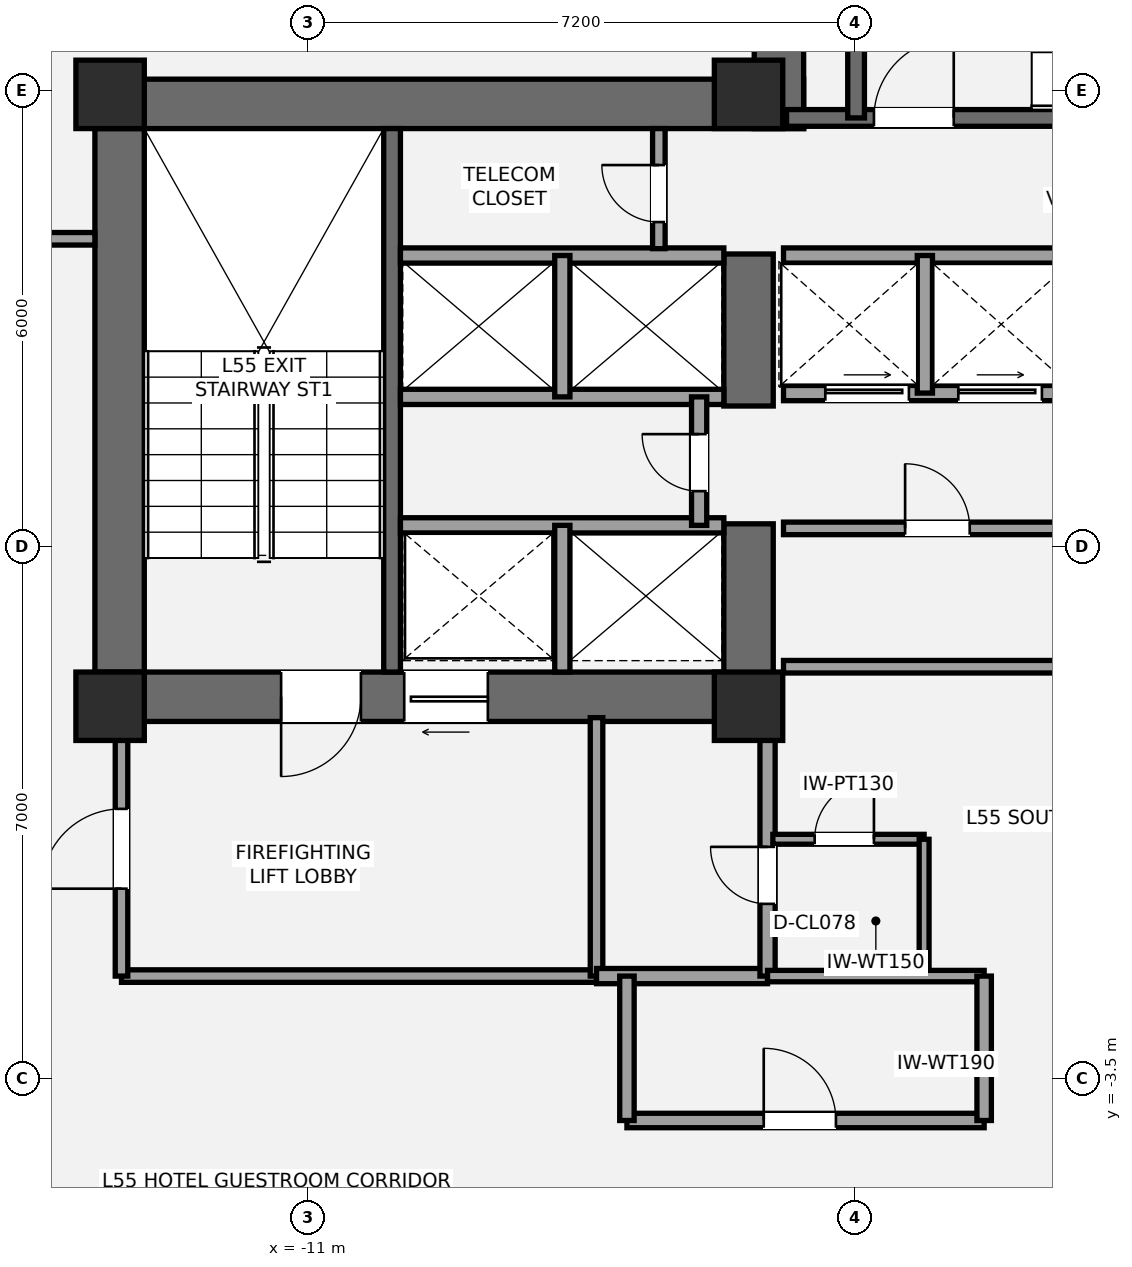
"""IFC4 building model, lengths in metres.
Left out: names, types, materials, properties, quantities, classifications, styles, units other than length and angle.
Written with IfcOpenShell. Run it as: python <this file> out.ifc"""

import sys

from ifc_helpers import new_model, si_unit, direction, frame, frame_2d, origin, origin_2d, place, context, subcontext, project, spatial, rectangle, extrude, element, fill, save


model = new_model("IFC4")
c1 = context("Model", 3, precision=1e-05, world=origin(), true_north=direction((0.0, 1.0)))
c2 = subcontext(c1, "Body", "Model", "MODEL_VIEW")
j1 = project(units=[si_unit("LENGTHUNIT", "METRE"), si_unit("PLANEANGLEUNIT", "RADIAN")], contexts=[c1])
p1 = place(None, origin())
s1 = spatial("IfcSite", under=j1, at=p1, CompositionType="ELEMENT")
p2 = place(p1, origin())
s2 = spatial("IfcBuilding", under=s1, at=p2, CompositionType="ELEMENT")
p3 = place(p2, frame((0.0, 0.0, 198.2)))
s3 = spatial("IfcBuildingStorey", under=s2, at=p3, CompositionType="ELEMENT", Elevation=198.2)
p4 = place(p3, frame((-13.475, 1.2, 0.0), z_axis=(0.0, 0.0, 1.0), x_axis=(0.0, 1.0, 0.0)))
e1 = element("IfcWall", 1, at=p4, inside=s3, PredefinedType="SHEAR", context=c2, shape_type="SweptSolid", body=[
    extrude(rectangle(XDim=8.45, YDim=0.65, at=frame_2d((4.225, 0.0))), origin(), (0.0, 0.0, 1.0), 3.2),
])
p5 = place(p3, frame((-13.8, 9.325, 0.0), z_axis=(0.0, 0.0, 1.0), x_axis=(1.0, 0.0, 0.0)))
e2 = element("IfcWall", 2, at=p5, inside=s3, PredefinedType="SHEAR", context=c2, shape_type="SweptSolid", body=[
    extrude(rectangle(XDim=9.325, YDim=0.65, at=frame_2d((4.663, 0.0))), origin(), (0.0, 0.0, 1.0), 3.2),
])
p6 = place(p3, frame((-4.875, 1.525, 0.0), z_axis=(0.0, 0.0, 1.0), x_axis=(-1.0, 0.0, 0.0)))
e3 = element("IfcWall", 3, at=p6, inside=s3, PredefinedType="SHEAR", context=c2, shape_type="SweptSolid", body=[
    extrude(rectangle(XDim=8.925, YDim=0.65, at=frame_2d((4.462, 0.0))), origin(), (0.0, 0.0, 1.0), 3.2),
])
p7 = place(p6, frame((5.425, 0.0, 0.0)))
e4 = element("IfcOpeningElement", 4, at=p7, cuts=e3, PredefinedType="OPENING", context=c2, shape_type="SweptSolid", body=[
    extrude(rectangle(XDim=1.05, YDim=2.15, at=frame_2d((0.525, 1.075))), frame((0.0, 0.335, 0.0), z_axis=(0.0, -1.0, 0.0), x_axis=(1.0, 0.0, 0.0)), (0.0, 0.0, 1.0), 0.67),
])
p8 = place(p6, frame((3.755, 0.0, 0.0)))
e5 = element("IfcOpeningElement", 5, at=p8, cuts=e3, PredefinedType="OPENING", context=c2, shape_type="SweptSolid", body=[
    extrude(rectangle(XDim=1.1, YDim=2.2, at=frame_2d((0.55, 1.1))), frame((0.0, 0.335, 0.0), z_axis=(0.0, -1.0, 0.0), x_axis=(1.0, 0.0, 0.0)), (0.0, 0.0, 1.0), 0.67),
])
p9 = place(p3, frame((-5.2, 1.2, 0.0), z_axis=(0.0, 0.0, 1.0), x_axis=(0.0, 1.0, 0.0)))
e6 = element("IfcWall", 6, at=p9, inside=s3, PredefinedType="SHEAR", context=c2, shape_type="SweptSolid", body=[
    extrude(rectangle(XDim=2.6, YDim=0.65, at=frame_2d((1.3, 0.0))), origin(), (0.0, 0.0, 1.0), 3.2),
])
p10 = place(p3, frame((-5.2, 5.35, 0.0), z_axis=(0.0, 0.0, 1.0), x_axis=(0.0, 1.0, 0.0)))
e7 = element("IfcWall", 7, at=p10, inside=s3, PredefinedType="SHEAR", context=c2, shape_type="SweptSolid", body=[
    extrude(rectangle(XDim=2.0, YDim=0.65, at=frame_2d((1.0, 0.0))), origin(), (0.0, 0.0, 1.0), 3.2),
])
p11 = place(p3, frame((-9.89, 1.85, 0.0), z_axis=(0.0, 0.0, 1.0), x_axis=(0.0, 1.0, 0.0)))
e8 = element("IfcWall", 8, at=p11, inside=s3, PredefinedType="SHEAR", context=c2, shape_type="SweptSolid", body=[
    extrude(rectangle(XDim=7.15, YDim=0.22, at=frame_2d((3.575, 0.0))), origin(), (0.0, 0.0, 1.0), 3.2),
])
p12 = place(p3, frame((-4.8, 9.0, 0.0), z_axis=(0.0, 0.0, 1.0), x_axis=(0.0, 1.0, 0.0)))
e9 = element("IfcWall", 9, at=p12, inside=s3, PredefinedType="SHEAR", context=c2, shape_type="SweptSolid", body=[
    extrude(rectangle(XDim=4.05, YDim=0.65, at=frame_2d((2.025, 0.0))), origin(), (0.0, 0.0, 1.0), 3.2),
])
p13 = place(p3, frame((-4.7, 9.14, 0.0), z_axis=(0.0, 0.0, 1.0), x_axis=(1.0, 0.0, 0.0)))
e10 = element("IfcWall", 10, at=p13, inside=s3, PredefinedType="SHEAR", context=c2, shape_type="SweptSolid", body=[
    extrude(rectangle(XDim=9.3, YDim=0.22, at=frame_2d((4.65, 0.0))), origin(), (0.0, 0.0, 1.0), 3.2),
])
p14 = place(p13, frame((1.15, 0.0, 0.0)))
e11 = element("IfcOpeningElement", 11, at=p14, cuts=e10, PredefinedType="OPENING", context=c2, shape_type="SweptSolid", body=[
    extrude(rectangle(XDim=1.05, YDim=2.15, at=frame_2d((0.525, 1.075))), frame((0.0, 0.12, 0.0), z_axis=(0.0, -1.0, 0.0), x_axis=(1.0, 0.0, 0.0)), (0.0, 0.0, 1.0), 0.24),
])
p15 = place(p3, frame((-3.785, 9.14, 0.0), z_axis=(0.0, 0.0, 1.0), x_axis=(0.0, 1.0, 0.0)))
e12 = element("IfcWall", 12, at=p15, inside=s3, PredefinedType="SHEAR", context=c2, shape_type="SweptSolid", body=[
    extrude(rectangle(XDim=3.26, YDim=0.22, at=frame_2d((1.63, 0.0))), origin(), (0.0, 0.0, 1.0), 3.2),
])
for number, where, z_axis, x_axis in (
    (13, (-13.6, 1.4, 0.0), (0.0, 0.0, 1.0), (1.0, 0.0, 0.0)),
    (14, (-13.6, 9.45, 0.0), (0.0, 0.0, 1.0), (1.0, 0.0, 0.0)),
    (15, (-5.2, 1.4, 0.0), (0.0, 0.0, 1.0), (1.0, 0.0, 0.0)),
    (16, (-5.2, 9.45, 0.0), (0.0, 0.0, 1.0), (1.0, 0.0, 0.0)),
):
    element("IfcColumn", number, at=place(p3, frame(where, z_axis=z_axis, x_axis=x_axis)), inside=s3, PredefinedType="COLUMN", context=c2, shape_type="SweptSolid", body=[
        extrude(rectangle(XDim=0.9, YDim=0.9, at=origin_2d()), origin(), (0.0, 0.0, 1.0), 3.2),
    ])
p16 = place(p3, frame((-13.45, -2.15, 0.0), z_axis=(0.0, 0.0, 1.0), x_axis=(1.0, 0.0, 0.0)))
e17 = element("IfcWall", 17, at=p16, inside=s3, PredefinedType="PARTITIONING", context=c2, shape_type="SweptSolid", body=[
    extrude(rectangle(XDim=6.25, YDim=0.165, at=frame_2d((3.125, 0.0))), origin(), (0.0, 0.0, 1.0), 2.96),
])
p17 = place(p3, frame((-13.45, -2.15, 0.0), z_axis=(0.0, 0.0, 1.0), x_axis=(0.0, 1.0, 0.0)))
e18 = element("IfcWall", 18, at=p17, inside=s3, PredefinedType="PARTITIONING", context=c2, shape_type="SweptSolid", body=[
    extrude(rectangle(XDim=3.4, YDim=0.165, at=frame_2d((1.7, 0.0))), origin(), (0.0, 0.0, 1.0), 2.413),
])
p18 = place(p17, frame((1.15, 0.0, 0.0)))
e19 = element("IfcOpeningElement", 19, at=p18, cuts=e18, PredefinedType="OPENING", context=c2, shape_type="SweptSolid", body=[
    extrude(rectangle(XDim=1.05, YDim=2.15, at=frame_2d((0.525, 1.075))), frame((0.0, 0.093, 0.0), z_axis=(0.0, -1.0, 0.0), x_axis=(1.0, 0.0, 0.0)), (0.0, 0.0, 1.0), 0.185),
])
p19 = place(p3, frame((-7.2, -2.15, 0.0), z_axis=(0.0, 0.0, 1.0), x_axis=(0.0, 1.0, 0.0)))
e20 = element("IfcWall", 20, at=p19, inside=s3, PredefinedType="PARTITIONING", context=c2, shape_type="SweptSolid", body=[
    extrude(rectangle(XDim=3.4, YDim=0.165, at=frame_2d((1.7, 0.0))), origin(), (0.0, 0.0, 1.0), 2.96),
])
p20 = place(p3, frame((-7.2, -2.15, 0.0), z_axis=(0.0, 0.0, 1.0), x_axis=(1.0, 0.0, 0.0)))
e21 = element("IfcWall", 21, at=p20, inside=s3, PredefinedType="SOLIDWALL", context=c2, shape_type="SweptSolid", body=[
    extrude(rectangle(XDim=2.25, YDim=0.2, at=frame_2d((1.125, 0.0))), origin(), (0.0, 0.0, 1.0), 2.96),
])
p21 = place(p3, frame((-4.95, -2.15, 0.0), z_axis=(0.0, 0.0, 1.0), x_axis=(0.0, 1.0, 0.0)))
e22 = element("IfcWall", 22, at=p21, inside=s3, PredefinedType="SOLIDWALL", context=c2, shape_type="SweptSolid", body=[
    extrude(rectangle(XDim=3.4, YDim=0.2, at=frame_2d((1.7, 0.0))), origin(), (0.0, 0.0, 1.0), 2.413),
])
p22 = place(p21, frame((0.95, 0.0, 0.0)))
e23 = element("IfcOpeningElement", 23, at=p22, cuts=e22, PredefinedType="OPENING", context=c2, shape_type="SweptSolid", body=[
    extrude(rectangle(XDim=0.75, YDim=2.1, at=frame_2d((0.375, 1.05))), frame((0.0, 0.11, 0.0), z_axis=(0.0, -1.0, 0.0), x_axis=(1.0, 0.0, 0.0)), (0.0, 0.0, 1.0), 0.22),
])
p23 = place(p3, frame((-4.88, -0.35, 0.0), z_axis=(0.0, 0.0, 1.0), x_axis=(1.0, 0.0, 0.0)))
e24 = element("IfcWall", 24, at=p23, inside=s3, PredefinedType="PARTITIONING", context=c2, shape_type="SweptSolid", body=[
    extrude(rectangle(XDim=1.99, YDim=0.13, at=frame_2d((0.995, 0.0))), origin(), (0.0, 0.0, 1.0), 2.96),
])
p24 = place(p23, frame((0.55, 0.0, 0.0)))
e25 = element("IfcOpeningElement", 25, at=p24, cuts=e24, PredefinedType="OPENING", context=c2, shape_type="SweptSolid", body=[
    extrude(rectangle(XDim=0.78, YDim=2.1, at=frame_2d((0.39, 1.05))), frame((0.0, 0.075, 0.0), z_axis=(0.0, -1.0, 0.0), x_axis=(1.0, 0.0, 0.0)), (0.0, 0.0, 1.0), 0.15),
])
p25 = place(p3, frame((-2.89, -2.15, 0.0), z_axis=(0.0, 0.0, 1.0), x_axis=(0.0, 1.0, 0.0)))
e26 = element("IfcWall", 26, at=p25, inside=s3, PredefinedType="PARTITIONING", context=c2, shape_type="SweptSolid", body=[
    extrude(rectangle(XDim=1.8, YDim=0.13, at=frame_2d((0.9, 0.0))), origin(), (0.0, 0.0, 1.0), 2.96),
])
p26 = place(p3, frame((-9.78, 3.78, 0.0), z_axis=(0.0, 0.0, 1.0), x_axis=(1.0, 0.0, 0.0)))
e27 = element("IfcWall", 27, at=p26, inside=s3, PredefinedType="SOLIDWALL", context=c2, shape_type="SweptSolid", body=[
    extrude(rectangle(XDim=4.255, YDim=0.2, at=frame_2d((2.127, 0.0))), origin(), (0.0, 0.0, 1.0), 2.96),
])
p27 = place(p3, frame((-7.65, 1.85, 0.0), z_axis=(0.0, 0.0, 1.0), x_axis=(0.0, 1.0, 0.0)))
e28 = element("IfcWall", 28, at=p27, inside=s3, PredefinedType="SOLIDWALL", context=c2, shape_type="SweptSolid", body=[
    extrude(rectangle(XDim=1.93, YDim=0.2, at=frame_2d((0.965, 0.0))), origin(), (0.0, 0.0, 1.0), 2.96),
])
for number, where, z_axis, x_axis in (
    (29, (-9.78, 5.47, 0.0), (0.0, 0.0, 1.0), (1.0, 0.0, 0.0)),
    (30, (-9.78, 7.33, 0.0), (0.0, 0.0, 1.0), (1.0, 0.0, 0.0)),
):
    element("IfcWall", number, at=place(p3, frame(where, z_axis=z_axis, x_axis=x_axis)), inside=s3, PredefinedType="SOLIDWALL", context=c2, shape_type="SweptSolid", body=[
        extrude(rectangle(XDim=4.255, YDim=0.2, at=frame_2d((2.127, 0.0))), origin(), (0.0, 0.0, 1.0), 2.96),
    ])
p28 = place(p3, frame((-7.65, 5.47, 0.0), z_axis=(0.0, 0.0, 1.0), x_axis=(0.0, 1.0, 0.0)))
e31 = element("IfcWall", 31, at=p28, inside=s3, PredefinedType="SOLIDWALL", context=c2, shape_type="SweptSolid", body=[
    extrude(rectangle(XDim=1.86, YDim=0.2, at=frame_2d((0.93, 0.0))), origin(), (0.0, 0.0, 1.0), 2.96),
])
p29 = place(p3, frame((-5.85, 3.78, 0.0), z_axis=(0.0, 0.0, 1.0), x_axis=(0.0, 1.0, 0.0)))
e32 = element("IfcWall", 32, at=p29, inside=s3, PredefinedType="SOLIDWALL", context=c2, shape_type="SweptSolid", body=[
    extrude(rectangle(XDim=1.69, YDim=0.2, at=frame_2d((0.845, 0.0))), origin(), (0.0, 0.0, 1.0), 2.96),
])
p30 = place(p29, frame((0.45, 0.0, 0.0)))
e33 = element("IfcOpeningElement", 33, at=p30, cuts=e32, PredefinedType="OPENING", context=c2, shape_type="SweptSolid", body=[
    extrude(rectangle(XDim=0.75, YDim=2.1, at=frame_2d((0.375, 1.05))), frame((0.0, 0.11, 0.0), z_axis=(0.0, -1.0, 0.0), x_axis=(1.0, 0.0, 0.0)), (0.0, 0.0, 1.0), 0.22),
])
p31 = place(p3, frame((-4.74, 1.92, 0.0), z_axis=(0.0, 0.0, 1.0), x_axis=(1.0, 0.0, 0.0)))
e34 = element("IfcWall", 34, at=p31, inside=s3, PredefinedType="PARTITIONING", context=c2, shape_type="SweptSolid", body=[
    extrude(rectangle(XDim=3.89, YDim=0.165, at=frame_2d((1.945, 0.0))), origin(), (0.0, 0.0, 1.0), 2.1),
])
p32 = place(p3, frame((-4.74, 3.74, 0.0), z_axis=(0.0, 0.0, 1.0), x_axis=(1.0, 0.0, 0.0)))
e35 = element("IfcWall", 35, at=p32, inside=s3, PredefinedType="PARTITIONING", context=c2, shape_type="SweptSolid", body=[
    extrude(rectangle(XDim=3.89, YDim=0.165, at=frame_2d((1.945, 0.0))), origin(), (0.0, 0.0, 1.0), 2.96),
])
p33 = place(p32, frame((1.6, 0.0, 0.0)))
e36 = element("IfcOpeningElement", 36, at=p33, cuts=e35, PredefinedType="OPENING", context=c2, shape_type="SweptSolid", body=[
    extrude(rectangle(XDim=0.85, YDim=2.1, at=frame_2d((0.425, 1.05))), frame((0.0, 0.093, 0.0), z_axis=(0.0, -1.0, 0.0), x_axis=(1.0, 0.0, 0.0)), (0.0, 0.0, 1.0), 0.185),
])
p34 = place(p3, frame((-4.74, 5.52, 0.0), z_axis=(0.0, 0.0, 1.0), x_axis=(1.0, 0.0, 0.0)))
e37 = element("IfcWall", 37, at=p34, inside=s3, PredefinedType="SOLIDWALL", context=c2, shape_type="SweptSolid", body=[
    extrude(rectangle(XDim=3.86, YDim=0.2, at=frame_2d((1.93, 0.0))), origin(), (0.0, 0.0, 1.0), 2.96),
])
p35 = place(p34, frame((0.55, 0.0, 0.0)))
e38 = element("IfcOpeningElement", 38, at=p35, cuts=e37, PredefinedType="OPENING", context=c2, shape_type="SweptSolid", body=[
    extrude(rectangle(XDim=1.1, YDim=2.2, at=frame_2d((0.55, 1.1))), frame((0.0, 0.11, 0.0), z_axis=(0.0, -1.0, 0.0), x_axis=(1.0, 0.0, 0.0)), (0.0, 0.0, 1.0), 0.22),
])
p36 = place(p34, frame((2.3, 0.0, 0.0)))
e39 = element("IfcOpeningElement", 39, at=p36, cuts=e37, PredefinedType="OPENING", context=c2, shape_type="SweptSolid", body=[
    extrude(rectangle(XDim=1.1, YDim=2.2, at=frame_2d((0.55, 1.1))), frame((0.0, 0.11, 0.0), z_axis=(0.0, -1.0, 0.0), x_axis=(1.0, 0.0, 0.0)), (0.0, 0.0, 1.0), 0.22),
])
p37 = place(p3, frame((-4.74, 7.33, 0.0), z_axis=(0.0, 0.0, 1.0), x_axis=(1.0, 0.0, 0.0)))
e40 = element("IfcWall", 40, at=p37, inside=s3, PredefinedType="SOLIDWALL", context=c2, shape_type="SweptSolid", body=[
    extrude(rectangle(XDim=3.86, YDim=0.2, at=frame_2d((1.93, 0.0))), origin(), (0.0, 0.0, 1.0), 2.96),
])
p38 = place(p3, frame((-2.88, 5.52, 0.0), z_axis=(0.0, 0.0, 1.0), x_axis=(0.0, 1.0, 0.0)))
e41 = element("IfcWall", 41, at=p38, inside=s3, PredefinedType="SOLIDWALL", context=c2, shape_type="SweptSolid", body=[
    extrude(rectangle(XDim=1.81, YDim=0.2, at=frame_2d((0.905, 0.0))), origin(), (0.0, 0.0, 1.0), 2.96),
])
p39 = place(p3, frame((-6.38, 7.42, 0.0), z_axis=(0.0, 0.0, 1.0), x_axis=(0.0, 1.0, 0.0)))
e42 = element("IfcWall", 42, at=p39, inside=s3, PredefinedType="PARTITIONING", context=c2, shape_type="SweptSolid", body=[
    extrude(rectangle(XDim=1.58, YDim=0.165, at=frame_2d((0.79, 0.0))), origin(), (0.0, 0.0, 1.0), 2.96),
])
p40 = place(p39, frame((0.35, 0.0, 0.0)))
e43 = element("IfcOpeningElement", 43, at=p40, cuts=e42, PredefinedType="OPENING", context=c2, shape_type="SweptSolid", body=[
    extrude(rectangle(XDim=0.75, YDim=2.1, at=frame_2d((0.375, 1.05))), frame((0.0, 0.093, 0.0), z_axis=(0.0, -1.0, 0.0), x_axis=(1.0, 0.0, 0.0)), (0.0, 0.0, 1.0), 0.185),
])
p41 = place(p3, frame((-6.8, -4.05, 0.0), z_axis=(0.0, 0.0, 1.0), x_axis=(1.0, 0.0, 0.0)))
e44 = element("IfcWall", 44, at=p41, inside=s3, PredefinedType="PLUMBINGWALL", context=c2, shape_type="SweptSolid", body=[
    extrude(rectangle(XDim=4.7, YDim=0.19, at=frame_2d((2.35, 0.0))), origin(), (0.0, 0.0, 1.0), 2.96),
])
p42 = place(p41, frame((1.8, 0.0, 0.0)))
e45 = element("IfcOpeningElement", 45, at=p42, cuts=e44, PredefinedType="OPENING", context=c2, shape_type="SweptSolid", body=[
    extrude(rectangle(XDim=0.95, YDim=2.15, at=frame_2d((0.475, 1.075))), frame((0.0, 0.105, 0.0), z_axis=(0.0, -1.0, 0.0), x_axis=(1.0, 0.0, 0.0)), (0.0, 0.0, 1.0), 0.21),
])
p43 = place(p3, frame((-4.95, -2.15, 0.0), z_axis=(0.0, 0.0, 1.0), x_axis=(1.0, 0.0, 0.0)))
e46 = element("IfcWall", 46, at=p43, inside=s3, PredefinedType="PLUMBINGWALL", context=c2, shape_type="SweptSolid", body=[
    extrude(rectangle(XDim=2.85, YDim=0.15, at=frame_2d((1.425, 0.0))), origin(), (0.0, 0.0, 1.0), 2.96),
])
for number, where, z_axis, x_axis in (
    (47, (-6.8, -4.05, 0.0), (0.0, 0.0, 1.0), (0.0, 1.0, 0.0)),
    (48, (-2.1, -4.05, 0.0), (0.0, 0.0, 1.0), (0.0, 1.0, 0.0)),
):
    element("IfcWall", number, at=place(p3, frame(where, z_axis=z_axis, x_axis=x_axis)), inside=s3, PredefinedType="PLUMBINGWALL", context=c2, shape_type="SweptSolid", body=[
        extrude(rectangle(XDim=1.9, YDim=0.19, at=frame_2d((0.95, 0.0))), origin(), (0.0, 0.0, 1.0), 2.96),
    ])
p44 = place(p3, frame((-16.8, 7.55, 0.0), z_axis=(0.0, 0.0, 1.0), x_axis=(1.0, 0.0, 0.0)))
e49 = element("IfcWall", 49, at=p44, inside=s3, PredefinedType="PARTITIONING", context=c2, shape_type="SweptSolid", body=[
    extrude(rectangle(XDim=3.0, YDim=0.165, at=frame_2d((1.5, 0.0))), origin(), (0.0, 0.0, 1.0), 2.413),
])
p45 = place(p44, frame((0.3, 0.0, 0.0)))
e50 = element("IfcOpeningElement", 50, at=p45, cuts=e49, PredefinedType="OPENING", context=c2, shape_type="SweptSolid", body=[
    extrude(rectangle(XDim=1.0, YDim=2.15, at=frame_2d((0.5, 1.075))), frame((0.0, 0.093, 0.0), z_axis=(0.0, -1.0, 0.0), x_axis=(1.0, 0.0, 0.0)), (0.0, 0.0, 1.0), 0.185),
])
p46 = place(p7, origin())
e51 = element("IfcDoor", 51, at=p46, inside=s3, OperationType="SINGLE_SWING_RIGHT", PredefinedType="DOOR", context=c2, shape_type="SweptSolid", body=[
    extrude(rectangle(XDim=1.05, YDim=2.15, at=frame_2d((0.525, 1.075))), frame((0.0, 0.025, 0.0), z_axis=(0.0, -1.0, 0.0), x_axis=(1.0, 0.0, 0.0)), (0.0, 0.0, 1.0), 0.05),
])
fill(e4, e51)
p47 = place(p14, origin())
e52 = element("IfcDoor", 52, at=p47, inside=s3, OperationType="SINGLE_SWING_RIGHT", PredefinedType="DOOR", context=c2, shape_type="SweptSolid", body=[
    extrude(rectangle(XDim=1.05, YDim=2.15, at=frame_2d((0.525, 1.075))), frame((0.0, 0.025, 0.0), z_axis=(0.0, -1.0, 0.0), x_axis=(1.0, 0.0, 0.0)), (0.0, 0.0, 1.0), 0.05),
])
fill(e11, e52)
p48 = place(p18, origin())
e53 = element("IfcDoor", 53, at=p48, inside=s3, OperationType="SINGLE_SWING_LEFT", PredefinedType="DOOR", context=c2, shape_type="SweptSolid", body=[
    extrude(rectangle(XDim=1.05, YDim=2.15, at=frame_2d((0.525, 1.075))), frame((0.0, 0.025, 0.0), z_axis=(0.0, -1.0, 0.0), x_axis=(1.0, 0.0, 0.0)), (0.0, 0.0, 1.0), 0.05),
])
fill(e19, e53)
p49 = place(p22, origin())
e54 = element("IfcDoor", 54, at=p49, inside=s3, OperationType="SINGLE_SWING_RIGHT", PredefinedType="DOOR", context=c2, shape_type="SweptSolid", body=[
    extrude(rectangle(XDim=0.75, YDim=2.1, at=frame_2d((0.375, 1.05))), frame((0.0, 0.025, 0.0), z_axis=(0.0, -1.0, 0.0), x_axis=(1.0, 0.0, 0.0)), (0.0, 0.0, 1.0), 0.05),
])
fill(e23, e54)
p50 = place(p24, origin())
e55 = element("IfcDoor", 55, at=p50, inside=s3, OperationType="SINGLE_SWING_RIGHT", PredefinedType="DOOR", context=c2, shape_type="SweptSolid", body=[
    extrude(rectangle(XDim=0.78, YDim=2.1, at=frame_2d((0.39, 1.05))), frame((0.0, 0.025, 0.0), z_axis=(0.0, -1.0, 0.0), x_axis=(1.0, 0.0, 0.0)), (0.0, 0.0, 1.0), 0.05),
])
fill(e25, e55)
p51 = place(p8, origin())
e56 = element("IfcDoor", 56, at=p51, inside=s3, OperationType="SLIDING_TO_LEFT", PredefinedType="DOOR", context=c2, shape_type="SweptSolid", body=[
    extrude(rectangle(XDim=1.1, YDim=2.2, at=frame_2d((0.55, 1.1))), frame((0.0, 0.025, 0.0), z_axis=(0.0, -1.0, 0.0), x_axis=(1.0, 0.0, 0.0)), (0.0, 0.0, 1.0), 0.05),
])
fill(e5, e56)
p52 = place(p30, origin())
e57 = element("IfcDoor", 57, at=p52, inside=s3, OperationType="SINGLE_SWING_RIGHT", PredefinedType="DOOR", context=c2, shape_type="SweptSolid", body=[
    extrude(rectangle(XDim=0.75, YDim=2.1, at=frame_2d((0.375, 1.05))), frame((0.0, 0.025, 0.0), z_axis=(0.0, -1.0, 0.0), x_axis=(1.0, 0.0, 0.0)), (0.0, 0.0, 1.0), 0.05),
])
fill(e33, e57)
p53 = place(p33, origin())
e58 = element("IfcDoor", 58, at=p53, inside=s3, OperationType="SINGLE_SWING_LEFT", PredefinedType="DOOR", context=c2, shape_type="SweptSolid", body=[
    extrude(rectangle(XDim=0.85, YDim=2.1, at=frame_2d((0.425, 1.05))), frame((0.0, 0.025, 0.0), z_axis=(0.0, -1.0, 0.0), x_axis=(1.0, 0.0, 0.0)), (0.0, 0.0, 1.0), 0.05),
])
fill(e36, e58)
p54 = place(p35, origin())
e59 = element("IfcDoor", 59, at=p54, inside=s3, OperationType="SLIDING_TO_LEFT", PredefinedType="DOOR", context=c2, shape_type="SweptSolid", body=[
    extrude(rectangle(XDim=1.1, YDim=2.2, at=frame_2d((0.55, 1.1))), frame((0.0, 0.025, 0.0), z_axis=(0.0, -1.0, 0.0), x_axis=(1.0, 0.0, 0.0)), (0.0, 0.0, 1.0), 0.05),
])
fill(e38, e59)
p55 = place(p36, origin())
e60 = element("IfcDoor", 60, at=p55, inside=s3, OperationType="SLIDING_TO_LEFT", PredefinedType="DOOR", context=c2, shape_type="SweptSolid", body=[
    extrude(rectangle(XDim=1.1, YDim=2.2, at=frame_2d((0.55, 1.1))), frame((0.0, 0.025, 0.0), z_axis=(0.0, -1.0, 0.0), x_axis=(1.0, 0.0, 0.0)), (0.0, 0.0, 1.0), 0.05),
])
fill(e39, e60)
p56 = place(p40, origin())
e61 = element("IfcDoor", 61, at=p56, inside=s3, OperationType="SINGLE_SWING_RIGHT", PredefinedType="DOOR", context=c2, shape_type="SweptSolid", body=[
    extrude(rectangle(XDim=0.75, YDim=2.1, at=frame_2d((0.375, 1.05))), frame((0.0, 0.025, 0.0), z_axis=(0.0, -1.0, 0.0), x_axis=(1.0, 0.0, 0.0)), (0.0, 0.0, 1.0), 0.05),
])
fill(e43, e61)
p57 = place(p42, origin())
e62 = element("IfcDoor", 62, at=p57, inside=s3, OperationType="SINGLE_SWING_LEFT", PredefinedType="DOOR", context=c2, shape_type="SweptSolid", body=[
    extrude(rectangle(XDim=0.95, YDim=2.15, at=frame_2d((0.475, 1.075))), frame((0.0, 0.025, 0.0), z_axis=(0.0, -1.0, 0.0), x_axis=(1.0, 0.0, 0.0)), (0.0, 0.0, 1.0), 0.05),
])
fill(e45, e62)
save(model, sys.argv[1])
